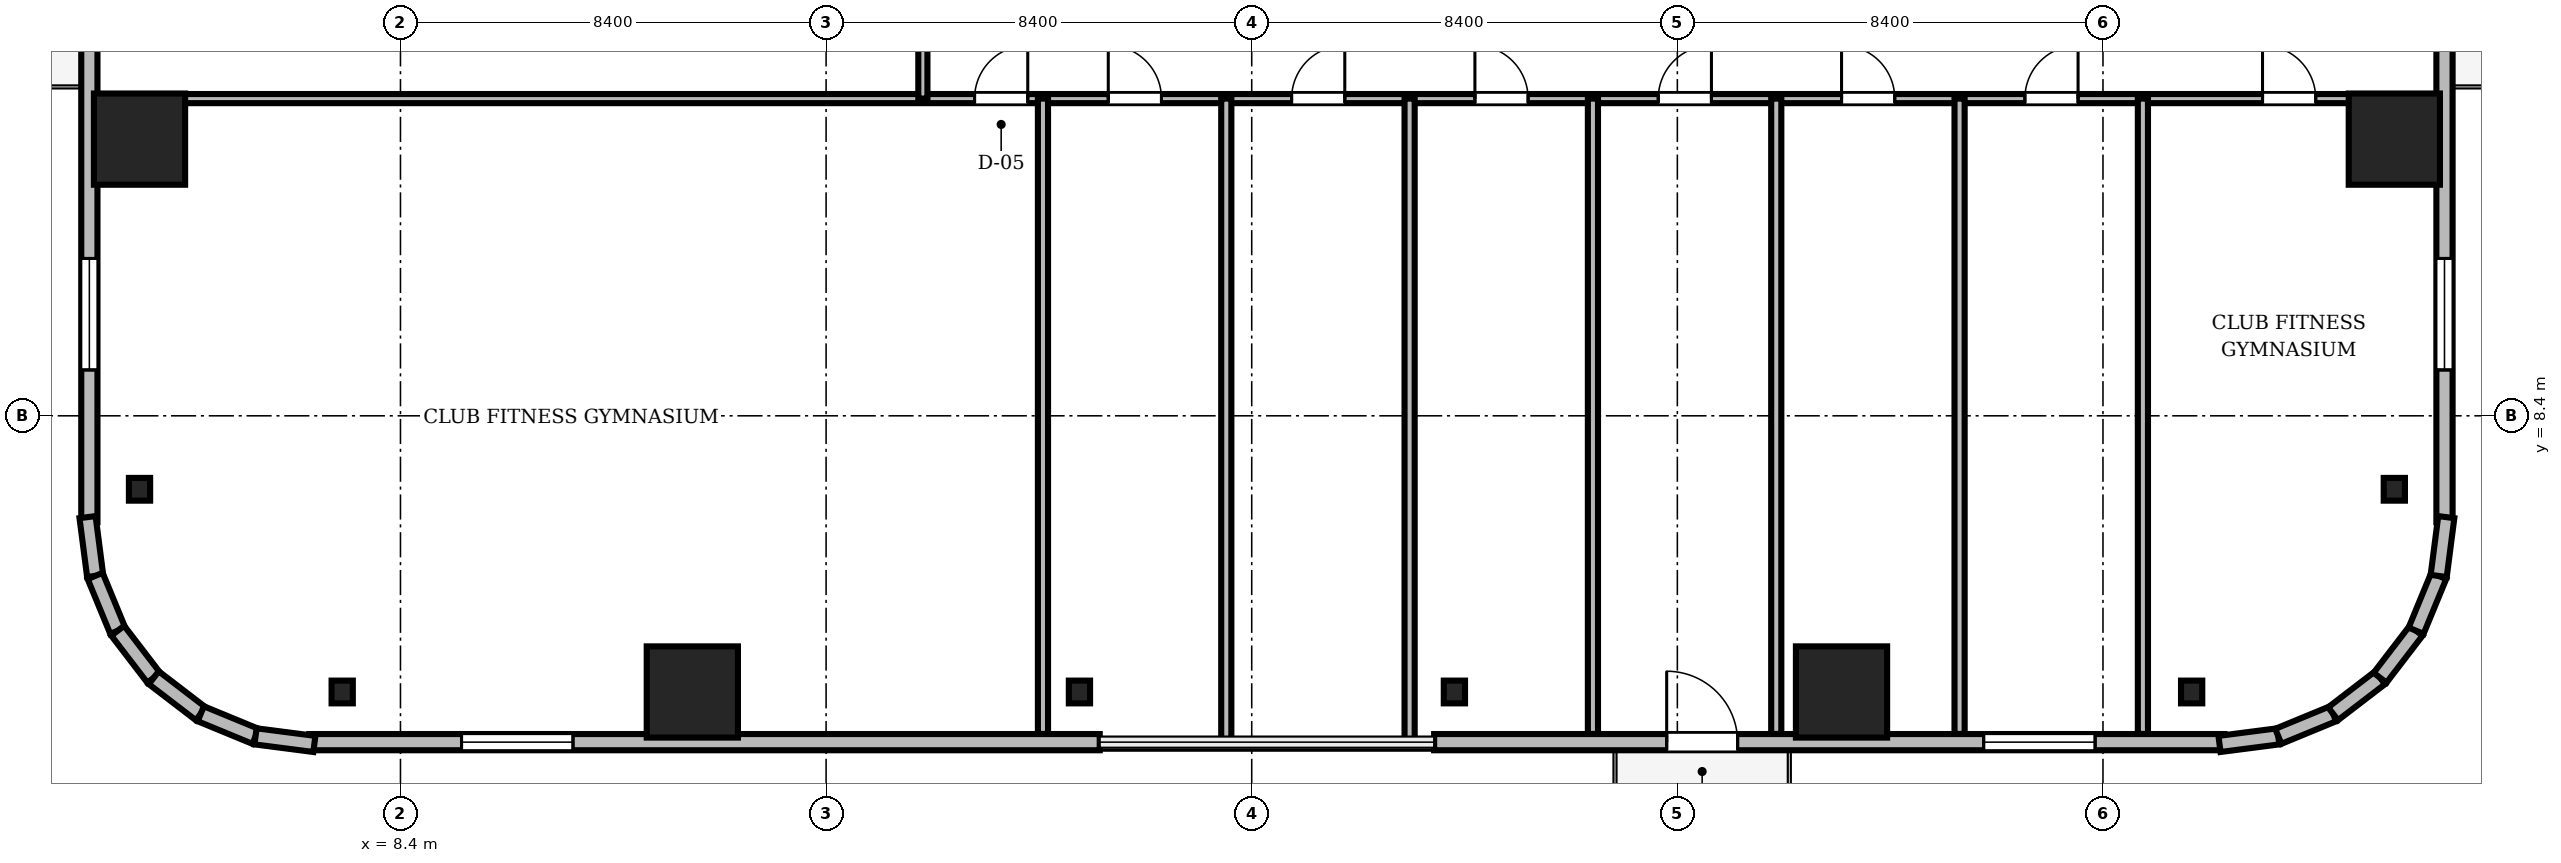
"""IFC4 building model, lengths in metres.
Left out: names, types, materials, properties, quantities, classifications, styles, units other than length and angle.
Written with IfcOpenShell. Run it as: python <this file> out.ifc"""

import sys

from ifc_helpers import new_model, si_unit, direction, frame, frame_2d, origin, origin_2d, place, context, subcontext, project, spatial, rectangle, i_section, extrude, source, transform, mapped, element, fill, save


model = new_model("IFC4")
c1 = context("Model", 3, precision=1e-05, world=origin(), true_north=direction((0.0, 1.0)))
c2 = subcontext(c1, "Body", "Model", "MODEL_VIEW")
j1 = project(units=[si_unit("LENGTHUNIT", "METRE"), si_unit("PLANEANGLEUNIT", "RADIAN")], contexts=[c1])
p1 = place(None, origin())
s1 = spatial("IfcSite", under=j1, at=p1, CompositionType="ELEMENT")
p2 = place(p1, origin())
s2 = spatial("IfcBuilding", under=s1, at=p2, CompositionType="ELEMENT")
p3 = place(p2, frame((0.0, 0.0, 60.45)))
s3 = spatial("IfcBuildingStorey", under=s2, at=p3, CompositionType="ELEMENT", Elevation=60.45)
m1 = source(origin(), c2, "Body", "SweptSolid", [
    extrude(rectangle(XDim=1.8, YDim=1.8, at=origin_2d()), origin(), (0.0, 0.0, 1.0), 3.41),
])
for number, where, z_axis, x_axis in (
    (1, (14.16, 2.95, 0.0), (0.0, 0.0, 1.0), (1.0, 0.0, 0.0)),
    (2, (36.84, 2.95, 0.0), (0.0, 0.0, 1.0), (1.0, 0.0, 0.0)),
    (3, (47.75, 13.86, 0.0), (0.0, 0.0, 1.0), (1.0, 0.0, 0.0)),
    (4, (3.25, 13.86, 0.0), (0.0, 0.0, 1.0), (1.0, 0.0, 0.0)),
):
    element("IfcColumn", number, at=place(p3, frame(where, z_axis=z_axis, x_axis=x_axis)), inside=s3, PredefinedType="COLUMN", context=c2, shape_type="MappedRepresentation", body=[
        mapped(m1, transform((0.0, 0.0, 0.0), scale=1.0)),
    ])
m2 = source(origin(), c2, "Body", "SweptSolid", [
    extrude(i_section(OverallWidth=0.419, OverallDepth=0.449, WebThickness=0.031, FlangeThickness=0.048, FilletRadius=0.015, at=origin_2d()), origin(), (0.0, 0.0, 1.0), 3.41),
])
for number, where, z_axis, x_axis in (
    (5, (7.25, 2.95, 0.0), (0.0, 0.0, 1.0), (1.0, 0.0, 0.0)),
    (6, (21.8, 2.95, 0.0), (0.0, 0.0, 1.0), (1.0, 0.0, 0.0)),
    (7, (29.2, 2.95, 0.0), (0.0, 0.0, 1.0), (1.0, 0.0, 0.0)),
    (8, (43.75, 2.95, 0.0), (0.0, 0.0, 1.0), (1.0, 0.0, 0.0)),
    (9, (47.75, 6.95, 0.0), (0.0, 0.0, 1.0), (1.0, 0.0, 0.0)),
    (10, (3.25, 6.95, 0.0), (0.0, 0.0, 1.0), (1.0, 0.0, 0.0)),
):
    element("IfcColumn", number, at=place(p3, frame(where, z_axis=z_axis, x_axis=x_axis)), inside=s3, PredefinedType="COLUMN", context=c2, shape_type="MappedRepresentation", body=[
        mapped(m2, transform((0.0, 0.0, 0.0), scale=1.0)),
    ])
m3 = source(origin(), c2, "Body", "SweptSolid", [
    extrude(rectangle(XDim=15.6, YDim=0.32, at=frame_2d((7.8, 0.0))), origin(), (0.0, 0.0, 1.0), 3.41),
])
p4 = place(p3, frame((6.6, 1.96, 0.0), z_axis=(0.0, 0.0, 1.0), x_axis=(1.0, 0.0, 0.0)))
e11 = element("IfcWall", 11, at=p4, inside=s3, PredefinedType="SOLIDWALL", context=c2, shape_type="MappedRepresentation", body=[
    mapped(m3, transform((0.0, 0.0, 0.0), scale=1.0)),
])
m4 = source(origin(), c2, "Body", "SweptSolid", [
    extrude(rectangle(XDim=2.2, YDim=2.4, at=frame_2d((1.1, 1.2))), frame((0.0, 0.17, 0.0), z_axis=(0.0, -1.0, 0.0), x_axis=(1.0, 0.0, 0.0)), (0.0, 0.0, 1.0), 0.34),
])
p5 = place(p4, frame((3.005, 0.0, 0.72)))
e12 = element("IfcOpeningElement", 12, at=p5, cuts=e11, PredefinedType="OPENING", context=c2, shape_type="MappedRepresentation", body=[
    mapped(m4, transform((0.0, 0.0, 0.0), scale=1.0)),
])
p6 = place(p3, frame((28.8, 1.96, 0.0), z_axis=(0.0, 0.0, 1.0), x_axis=(1.0, 0.0, 0.0)))
e13 = element("IfcWall", 13, at=p6, inside=s3, PredefinedType="SOLIDWALL", context=c2, shape_type="MappedRepresentation", body=[
    mapped(m3, transform((0.0, 0.0, 0.0), scale=1.0)),
])
m5 = source(origin(), c2, "Body", "SweptSolid", [
    extrude(rectangle(XDim=1.4, YDim=2.3, at=frame_2d((0.7, 1.15))), frame((0.0, 0.17, 0.0), z_axis=(0.0, -1.0, 0.0), x_axis=(1.0, 0.0, 0.0)), (0.0, 0.0, 1.0), 0.34),
])
p7 = place(p6, frame((4.59, 0.0, 0.0)))
e14 = element("IfcOpeningElement", 14, at=p7, cuts=e13, PredefinedType="OPENING", context=c2, shape_type="MappedRepresentation", body=[
    mapped(m5, transform((0.0, 0.0, 0.0), scale=1.0)),
])
p8 = place(p6, frame((10.845, 0.0, 0.72)))
e15 = element("IfcOpeningElement", 15, at=p8, cuts=e13, PredefinedType="OPENING", context=c2, shape_type="MappedRepresentation", body=[
    mapped(m4, transform((0.0, 0.0, 0.0), scale=1.0)),
])
p9 = place(p3, frame((2.26, 21.9, 0.0), z_axis=(0.0, 0.0, 1.0), x_axis=(0.0, -1.0, 0.0)))
e16 = element("IfcWall", 16, at=p9, inside=s3, PredefinedType="SOLIDWALL", context=c2, shape_type="MappedRepresentation", body=[
    mapped(m3, transform((0.0, 0.0, 0.0), scale=1.0)),
])
p10 = place(p9, frame((4.59, 0.0, 0.0)))
e17 = element("IfcOpeningElement", 17, at=p10, cuts=e16, PredefinedType="OPENING", context=c2, shape_type="MappedRepresentation", body=[
    mapped(m5, transform((0.0, 0.0, 0.0), scale=1.0)),
])
p11 = place(p9, frame((10.395, 0.0, 0.72)))
e18 = element("IfcOpeningElement", 18, at=p11, cuts=e16, PredefinedType="OPENING", context=c2, shape_type="MappedRepresentation", body=[
    mapped(m4, transform((0.0, 0.0, 0.0), scale=1.0)),
])
p12 = place(p3, frame((48.74, 6.3, 0.0), z_axis=(0.0, 0.0, 1.0), x_axis=(0.0, 1.0, 0.0)))
e19 = element("IfcWall", 19, at=p12, inside=s3, PredefinedType="SOLIDWALL", context=c2, shape_type="MappedRepresentation", body=[
    mapped(m3, transform((0.0, 0.0, 0.0), scale=1.0)),
])
p13 = place(p12, frame((9.61, 0.0, 0.0)))
e20 = element("IfcOpeningElement", 20, at=p13, cuts=e19, PredefinedType="OPENING", context=c2, shape_type="MappedRepresentation", body=[
    mapped(m5, transform((0.0, 0.0, 0.0), scale=1.0)),
])
p14 = place(p12, frame((3.005, 0.0, 0.72)))
e21 = element("IfcOpeningElement", 21, at=p14, cuts=e19, PredefinedType="OPENING", context=c2, shape_type="MappedRepresentation", body=[
    mapped(m4, transform((0.0, 0.0, 0.0), scale=1.0)),
])
m6 = source(origin(), c2, "Body", "SweptSolid", [
    extrude(rectangle(XDim=1.171, YDim=0.32, at=frame_2d((0.585, 0.0))), origin(), (0.0, 0.0, 1.0), 3.41),
])
p15 = place(p3, frame((2.224, 6.401, 0.0), z_axis=(0.0, 0.0, 1.0), x_axis=(0.128269133229, -0.991739395941, 0.0)))
e22 = element("IfcWall", 22, at=p15, inside=s3, PredefinedType="SOLIDWALL", context=c2, shape_type="MappedRepresentation", body=[
    mapped(m6, transform((0.0, 0.0, 0.0), scale=1.0)),
])
m7 = source(origin(), c2, "Body", "SweptSolid", [
    extrude(rectangle(XDim=1.169, YDim=0.32, at=frame_2d((0.584, 0.0))), origin(), (0.0, 0.0, 1.0), 3.41),
])
for number, where, z_axis, x_axis in (
    (23, (2.375, 5.24, 0.0), (0.0, 0.0, 1.0), (0.381, -0.925, 0.0)),
    (24, (2.82, 4.159, 0.0), (0.0, 0.0, 1.0), (0.608, -0.794, 0.0)),
):
    element("IfcWall", number, at=place(p3, frame(where, z_axis=z_axis, x_axis=x_axis)), inside=s3, PredefinedType="SOLIDWALL", context=c2, shape_type="MappedRepresentation", body=[
        mapped(m7, transform((0.0, 0.0, 0.0), scale=1.0)),
    ])
m8 = source(origin(), c2, "Body", "SweptSolid", [
    extrude(rectangle(XDim=1.169, YDim=0.32, at=frame_2d((0.584, 0.0))), origin(), (0.0, 0.0, 1.0), 3.41),
])
p16 = place(p3, frame((3.531, 3.231, 0.0), z_axis=(0.0, 0.0, 1.0), x_axis=(0.793663520347, -0.608356981114, 0.0)))
e25 = element("IfcWall", 25, at=p16, inside=s3, PredefinedType="SOLIDWALL", context=c2, shape_type="MappedRepresentation", body=[
    mapped(m8, transform((0.0, 0.0, 0.0), scale=1.0)),
])
m9 = source(origin(), c2, "Body", "SweptSolid", [
    extrude(rectangle(XDim=1.169, YDim=0.32, at=frame_2d((0.585, 0.0))), origin(), (0.0, 0.0, 1.0), 3.41),
])
p17 = place(p3, frame((4.459, 2.52, 0.0), z_axis=(0.0, 0.0, 1.0), x_axis=(0.924479075121, -0.381232789334, 0.0)))
e26 = element("IfcWall", 26, at=p17, inside=s3, PredefinedType="SOLIDWALL", context=c2, shape_type="MappedRepresentation", body=[
    mapped(m9, transform((0.0, 0.0, 0.0), scale=1.0)),
])
m10 = source(origin(), c2, "Body", "SweptSolid", [
    extrude(rectangle(XDim=1.17, YDim=0.32, at=frame_2d((0.585, 0.0))), origin(), (0.0, 0.0, 1.0), 3.41),
])
for number, where, z_axis, x_axis in (
    (27, (5.54, 2.074, 0.0), (0.0, 0.0, 1.0), (0.992, -0.128, 0.0)),
    (28, (44.3, 1.925, 0.0), (0.0, 0.0, 1.0), (0.992, 0.128, 0.0)),
):
    element("IfcWall", number, at=place(p3, frame(where, z_axis=z_axis, x_axis=x_axis)), inside=s3, PredefinedType="SOLIDWALL", context=c2, shape_type="MappedRepresentation", body=[
        mapped(m10, transform((0.0, 0.0, 0.0), scale=1.0)),
    ])
p18 = place(p3, frame((45.46, 2.074, 0.0), z_axis=(0.0, 0.0, 1.0), x_axis=(0.924479075121, 0.381232789334, 0.0)))
e29 = element("IfcWall", 29, at=p18, inside=s3, PredefinedType="SOLIDWALL", context=c2, shape_type="MappedRepresentation", body=[
    mapped(m9, transform((0.0, 0.0, 0.0), scale=1.0)),
])
p19 = place(p3, frame((46.541, 2.52, 0.0), z_axis=(0.0, 0.0, 1.0), x_axis=(0.793663520347, 0.608356981114, 0.0)))
e30 = element("IfcWall", 30, at=p19, inside=s3, PredefinedType="SOLIDWALL", context=c2, shape_type="MappedRepresentation", body=[
    mapped(m8, transform((0.0, 0.0, 0.0), scale=1.0)),
])
for number, where, z_axis, x_axis in (
    (31, (47.469, 3.231, 0.0), (0.0, 0.0, 1.0), (0.608, 0.794, 0.0)),
    (32, (48.18, 4.159, 0.0), (0.0, 0.0, 1.0), (0.381, 0.925, 0.0)),
):
    element("IfcWall", number, at=place(p3, frame(where, z_axis=z_axis, x_axis=x_axis)), inside=s3, PredefinedType="SOLIDWALL", context=c2, shape_type="MappedRepresentation", body=[
        mapped(m7, transform((0.0, 0.0, 0.0), scale=1.0)),
    ])
p20 = place(p3, frame((48.625, 5.24, 0.0), z_axis=(0.0, 0.0, 1.0), x_axis=(0.128269133229, 0.991739395941, 0.0)))
e33 = element("IfcWall", 33, at=p20, inside=s3, PredefinedType="SOLIDWALL", context=c2, shape_type="MappedRepresentation", body=[
    mapped(m6, transform((0.0, 0.0, 0.0), scale=1.0)),
])
m11 = source(origin(), c2, "Body", "SweptSolid", [
    extrude(rectangle(XDim=46.156, YDim=0.18, at=frame_2d((23.078, 0.0))), origin(), (0.0, 0.0, 1.0), 2.652),
])
p21 = place(p3, frame((2.422, 14.66, 0.0), z_axis=(0.0, 0.0, 1.0), x_axis=(1.0, 0.0, 0.0)))
e34 = element("IfcWall", 34, at=p21, inside=s3, PredefinedType="PARTITIONING", context=c2, shape_type="MappedRepresentation", body=[
    mapped(m11, transform((0.0, 0.0, 0.0), scale=1.0)),
])
m12 = source(origin(), c2, "Body", "SweptSolid", [
    extrude(rectangle(XDim=1.05, YDim=2.2, at=frame_2d((0.525, 1.1))), frame((0.0, 0.1, 0.0), z_axis=(0.0, -1.0, 0.0), x_axis=(1.0, 0.0, 0.0)), (0.0, 0.0, 1.0), 0.2),
])
p22 = place(p21, frame((17.308, 0.0, 0.0)))
e35 = element("IfcOpeningElement", 35, at=p22, cuts=e34, PredefinedType="OPENING", context=c2, shape_type="MappedRepresentation", body=[
    mapped(m12, transform((0.0, 0.0, 0.0), scale=1.0)),
])
p23 = place(p21, frame((19.947, 0.0, 0.0)))
e36 = element("IfcOpeningElement", 36, at=p23, cuts=e34, PredefinedType="OPENING", context=c2, shape_type="MappedRepresentation", body=[
    mapped(m12, transform((0.0, 0.0, 0.0), scale=1.0)),
])
p24 = place(p21, frame((23.565, 0.0, 0.0)))
e37 = element("IfcOpeningElement", 37, at=p24, cuts=e34, PredefinedType="OPENING", context=c2, shape_type="MappedRepresentation", body=[
    mapped(m12, transform((0.0, 0.0, 0.0), scale=1.0)),
])
p25 = place(p21, frame((27.183, 0.0, 0.0)))
e38 = element("IfcOpeningElement", 38, at=p25, cuts=e34, PredefinedType="OPENING", context=c2, shape_type="MappedRepresentation", body=[
    mapped(m12, transform((0.0, 0.0, 0.0), scale=1.0)),
])
p26 = place(p21, frame((30.801, 0.0, 0.0)))
e39 = element("IfcOpeningElement", 39, at=p26, cuts=e34, PredefinedType="OPENING", context=c2, shape_type="MappedRepresentation", body=[
    mapped(m12, transform((0.0, 0.0, 0.0), scale=1.0)),
])
p27 = place(p21, frame((34.419, 0.0, 0.0)))
e40 = element("IfcOpeningElement", 40, at=p27, cuts=e34, PredefinedType="OPENING", context=c2, shape_type="MappedRepresentation", body=[
    mapped(m12, transform((0.0, 0.0, 0.0), scale=1.0)),
])
p28 = place(p21, frame((38.037, 0.0, 0.0)))
e41 = element("IfcOpeningElement", 41, at=p28, cuts=e34, PredefinedType="OPENING", context=c2, shape_type="MappedRepresentation", body=[
    mapped(m12, transform((0.0, 0.0, 0.0), scale=1.0)),
])
p29 = place(p21, frame((42.727, 0.0, 0.0)))
e42 = element("IfcOpeningElement", 42, at=p29, cuts=e34, PredefinedType="OPENING", context=c2, shape_type="MappedRepresentation", body=[
    mapped(m12, transform((0.0, 0.0, 0.0), scale=1.0)),
])
m13 = source(origin(), c2, "Body", "SweptSolid", [
    extrude(rectangle(XDim=13.89, YDim=0.18, at=frame_2d((6.945, 0.0))), origin(), (0.0, 0.0, 1.0), 2.802),
])
p30 = place(p3, frame((18.71, 14.66, 0.0), z_axis=(0.0, 0.0, 1.0), x_axis=(0.0, 1.0, 0.0)))
e43 = element("IfcWall", 43, at=p30, inside=s3, PredefinedType="PARTITIONING", context=c2, shape_type="MappedRepresentation", body=[
    mapped(m13, transform((0.0, 0.0, 0.0), scale=1.0)),
])
m14 = source(origin(), c2, "Body", "SweptSolid", [
    extrude(rectangle(XDim=12.538, YDim=0.2, at=frame_2d((6.269, 0.0))), origin(), (0.0, 0.0, 1.0), 2.652),
])
p31 = place(p3, frame((21.08, 2.122, 0.0), z_axis=(0.0, 0.0, 1.0), x_axis=(0.0, 1.0, 0.0)))
e44 = element("IfcWall", 44, at=p31, inside=s3, PredefinedType="PARTITIONING", context=c2, shape_type="MappedRepresentation", body=[
    mapped(m14, transform((0.0, 0.0, 0.0), scale=1.0)),
])
m15 = source(origin(), c2, "Body", "SweptSolid", [
    extrude(rectangle(XDim=12.73, YDim=0.2, at=frame_2d((6.365, 0.0))), origin(), (0.0, 0.0, 1.0), 2.652),
])
for number, where, z_axis, x_axis in (
    (45, (24.698, 1.93, 0.0), (0.0, 0.0, 1.0), (0.0, 1.0, 0.0)),
    (46, (28.316, 1.93, 0.0), (0.0, 0.0, 1.0), (0.0, 1.0, 0.0)),
):
    element("IfcWall", number, at=place(p3, frame(where, z_axis=z_axis, x_axis=x_axis)), inside=s3, PredefinedType="PARTITIONING", context=c2, shape_type="MappedRepresentation", body=[
        mapped(m15, transform((0.0, 0.0, 0.0), scale=1.0)),
    ])
for number, where, z_axis, x_axis in (
    (47, (31.934, 2.122, 0.0), (0.0, 0.0, 1.0), (0.0, 1.0, 0.0)),
    (48, (35.552, 2.122, 0.0), (0.0, 0.0, 1.0), (0.0, 1.0, 0.0)),
    (49, (39.17, 2.122, 0.0), (0.0, 0.0, 1.0), (0.0, 1.0, 0.0)),
    (50, (42.788, 2.122, 0.0), (0.0, 0.0, 1.0), (0.0, 1.0, 0.0)),
):
    element("IfcWall", number, at=place(p3, frame(where, z_axis=z_axis, x_axis=x_axis)), inside=s3, PredefinedType="PARTITIONING", context=c2, shape_type="MappedRepresentation", body=[
        mapped(m14, transform((0.0, 0.0, 0.0), scale=1.0)),
    ])
m16 = source(origin(), c2, "Body", "SweptSolid", [
    extrude(rectangle(XDim=1.4, YDim=2.3, at=frame_2d((0.7, 1.15))), frame((0.0, 0.025, 0.0), z_axis=(0.0, -1.0, 0.0), x_axis=(1.0, 0.0, 0.0)), (0.0, 0.0, 1.0), 0.05),
])
p32 = place(p7, frame((1.4, 0.0, 0.0), z_axis=(0.0, 0.0, 1.0), x_axis=(-1.0, 0.0, 0.0)))
e51 = element("IfcDoor", 51, at=p32, inside=s3, OperationType="DOUBLE_DOOR_SLIDING", PredefinedType="DOOR", context=c2, shape_type="MappedRepresentation", body=[
    mapped(m16, transform((0.0, 0.0, 0.0), scale=1.0)),
])
fill(e14, e51)
m17 = source(origin(), c2, "Body", "SweptSolid", [
    extrude(rectangle(XDim=2.2, YDim=2.4, at=frame_2d((1.1, 1.2))), frame((0.0, 0.03, 0.0), z_axis=(0.0, -1.0, 0.0), x_axis=(1.0, 0.0, 0.0)), (0.0, 0.0, 1.0), 0.06),
])
p33 = place(p5, origin())
e52 = element("IfcWindow", 52, at=p33, inside=s3, PartitioningType="SINGLE_PANEL", PredefinedType="WINDOW", context=c2, shape_type="MappedRepresentation", body=[
    mapped(m17, transform((0.0, 0.0, 0.0), scale=1.0)),
])
fill(e12, e52)
p34 = place(p8, origin())
e53 = element("IfcWindow", 53, at=p34, inside=s3, PartitioningType="SINGLE_PANEL", PredefinedType="WINDOW", context=c2, shape_type="MappedRepresentation", body=[
    mapped(m17, transform((0.0, 0.0, 0.0), scale=1.0)),
])
fill(e15, e53)
p35 = place(p11, origin())
e54 = element("IfcWindow", 54, at=p35, inside=s3, PartitioningType="SINGLE_PANEL", PredefinedType="WINDOW", context=c2, shape_type="MappedRepresentation", body=[
    mapped(m17, transform((0.0, 0.0, 0.0), scale=1.0)),
])
fill(e18, e54)
p36 = place(p14, origin())
e55 = element("IfcWindow", 55, at=p36, inside=s3, PartitioningType="SINGLE_PANEL", PredefinedType="WINDOW", context=c2, shape_type="MappedRepresentation", body=[
    mapped(m17, transform((0.0, 0.0, 0.0), scale=1.0)),
])
fill(e21, e55)
m18 = source(origin(), c2, "Body", "SweptSolid", [
    extrude(rectangle(XDim=1.05, YDim=2.2, at=frame_2d((0.525, 1.1))), frame((0.0, 0.025, 0.0), z_axis=(0.0, -1.0, 0.0), x_axis=(1.0, 0.0, 0.0)), (0.0, 0.0, 1.0), 0.05),
])
p37 = place(p22, origin())
e56 = element("IfcDoor", 56, at=p37, inside=s3, OperationType="SINGLE_SWING_RIGHT", PredefinedType="DOOR", context=c2, shape_type="MappedRepresentation", body=[
    mapped(m18, transform((0.0, 0.0, 0.0), scale=1.0)),
])
fill(e35, e56)
p38 = place(p23, origin())
e57 = element("IfcDoor", 57, at=p38, inside=s3, OperationType="SINGLE_SWING_LEFT", PredefinedType="DOOR", context=c2, shape_type="MappedRepresentation", body=[
    mapped(m18, transform((0.0, 0.0, 0.0), scale=1.0)),
])
fill(e36, e57)
p39 = place(p24, origin())
e58 = element("IfcDoor", 58, at=p39, inside=s3, OperationType="SINGLE_SWING_RIGHT", PredefinedType="DOOR", context=c2, shape_type="MappedRepresentation", body=[
    mapped(m18, transform((0.0, 0.0, 0.0), scale=1.0)),
])
fill(e37, e58)
p40 = place(p25, origin())
e59 = element("IfcDoor", 59, at=p40, inside=s3, OperationType="SINGLE_SWING_LEFT", PredefinedType="DOOR", context=c2, shape_type="MappedRepresentation", body=[
    mapped(m18, transform((0.0, 0.0, 0.0), scale=1.0)),
])
fill(e38, e59)
p41 = place(p26, origin())
e60 = element("IfcDoor", 60, at=p41, inside=s3, OperationType="SINGLE_SWING_RIGHT", PredefinedType="DOOR", context=c2, shape_type="MappedRepresentation", body=[
    mapped(m18, transform((0.0, 0.0, 0.0), scale=1.0)),
])
fill(e39, e60)
p42 = place(p27, origin())
e61 = element("IfcDoor", 61, at=p42, inside=s3, OperationType="SINGLE_SWING_LEFT", PredefinedType="DOOR", context=c2, shape_type="MappedRepresentation", body=[
    mapped(m18, transform((0.0, 0.0, 0.0), scale=1.0)),
])
fill(e40, e61)
p43 = place(p28, origin())
e62 = element("IfcDoor", 62, at=p43, inside=s3, OperationType="SINGLE_SWING_RIGHT", PredefinedType="DOOR", context=c2, shape_type="MappedRepresentation", body=[
    mapped(m18, transform((0.0, 0.0, 0.0), scale=1.0)),
])
fill(e41, e62)
p44 = place(p29, origin())
e63 = element("IfcDoor", 63, at=p44, inside=s3, OperationType="SINGLE_SWING_LEFT", PredefinedType="DOOR", context=c2, shape_type="MappedRepresentation", body=[
    mapped(m18, transform((0.0, 0.0, 0.0), scale=1.0)),
])
fill(e42, e63)
save(model, sys.argv[1])
